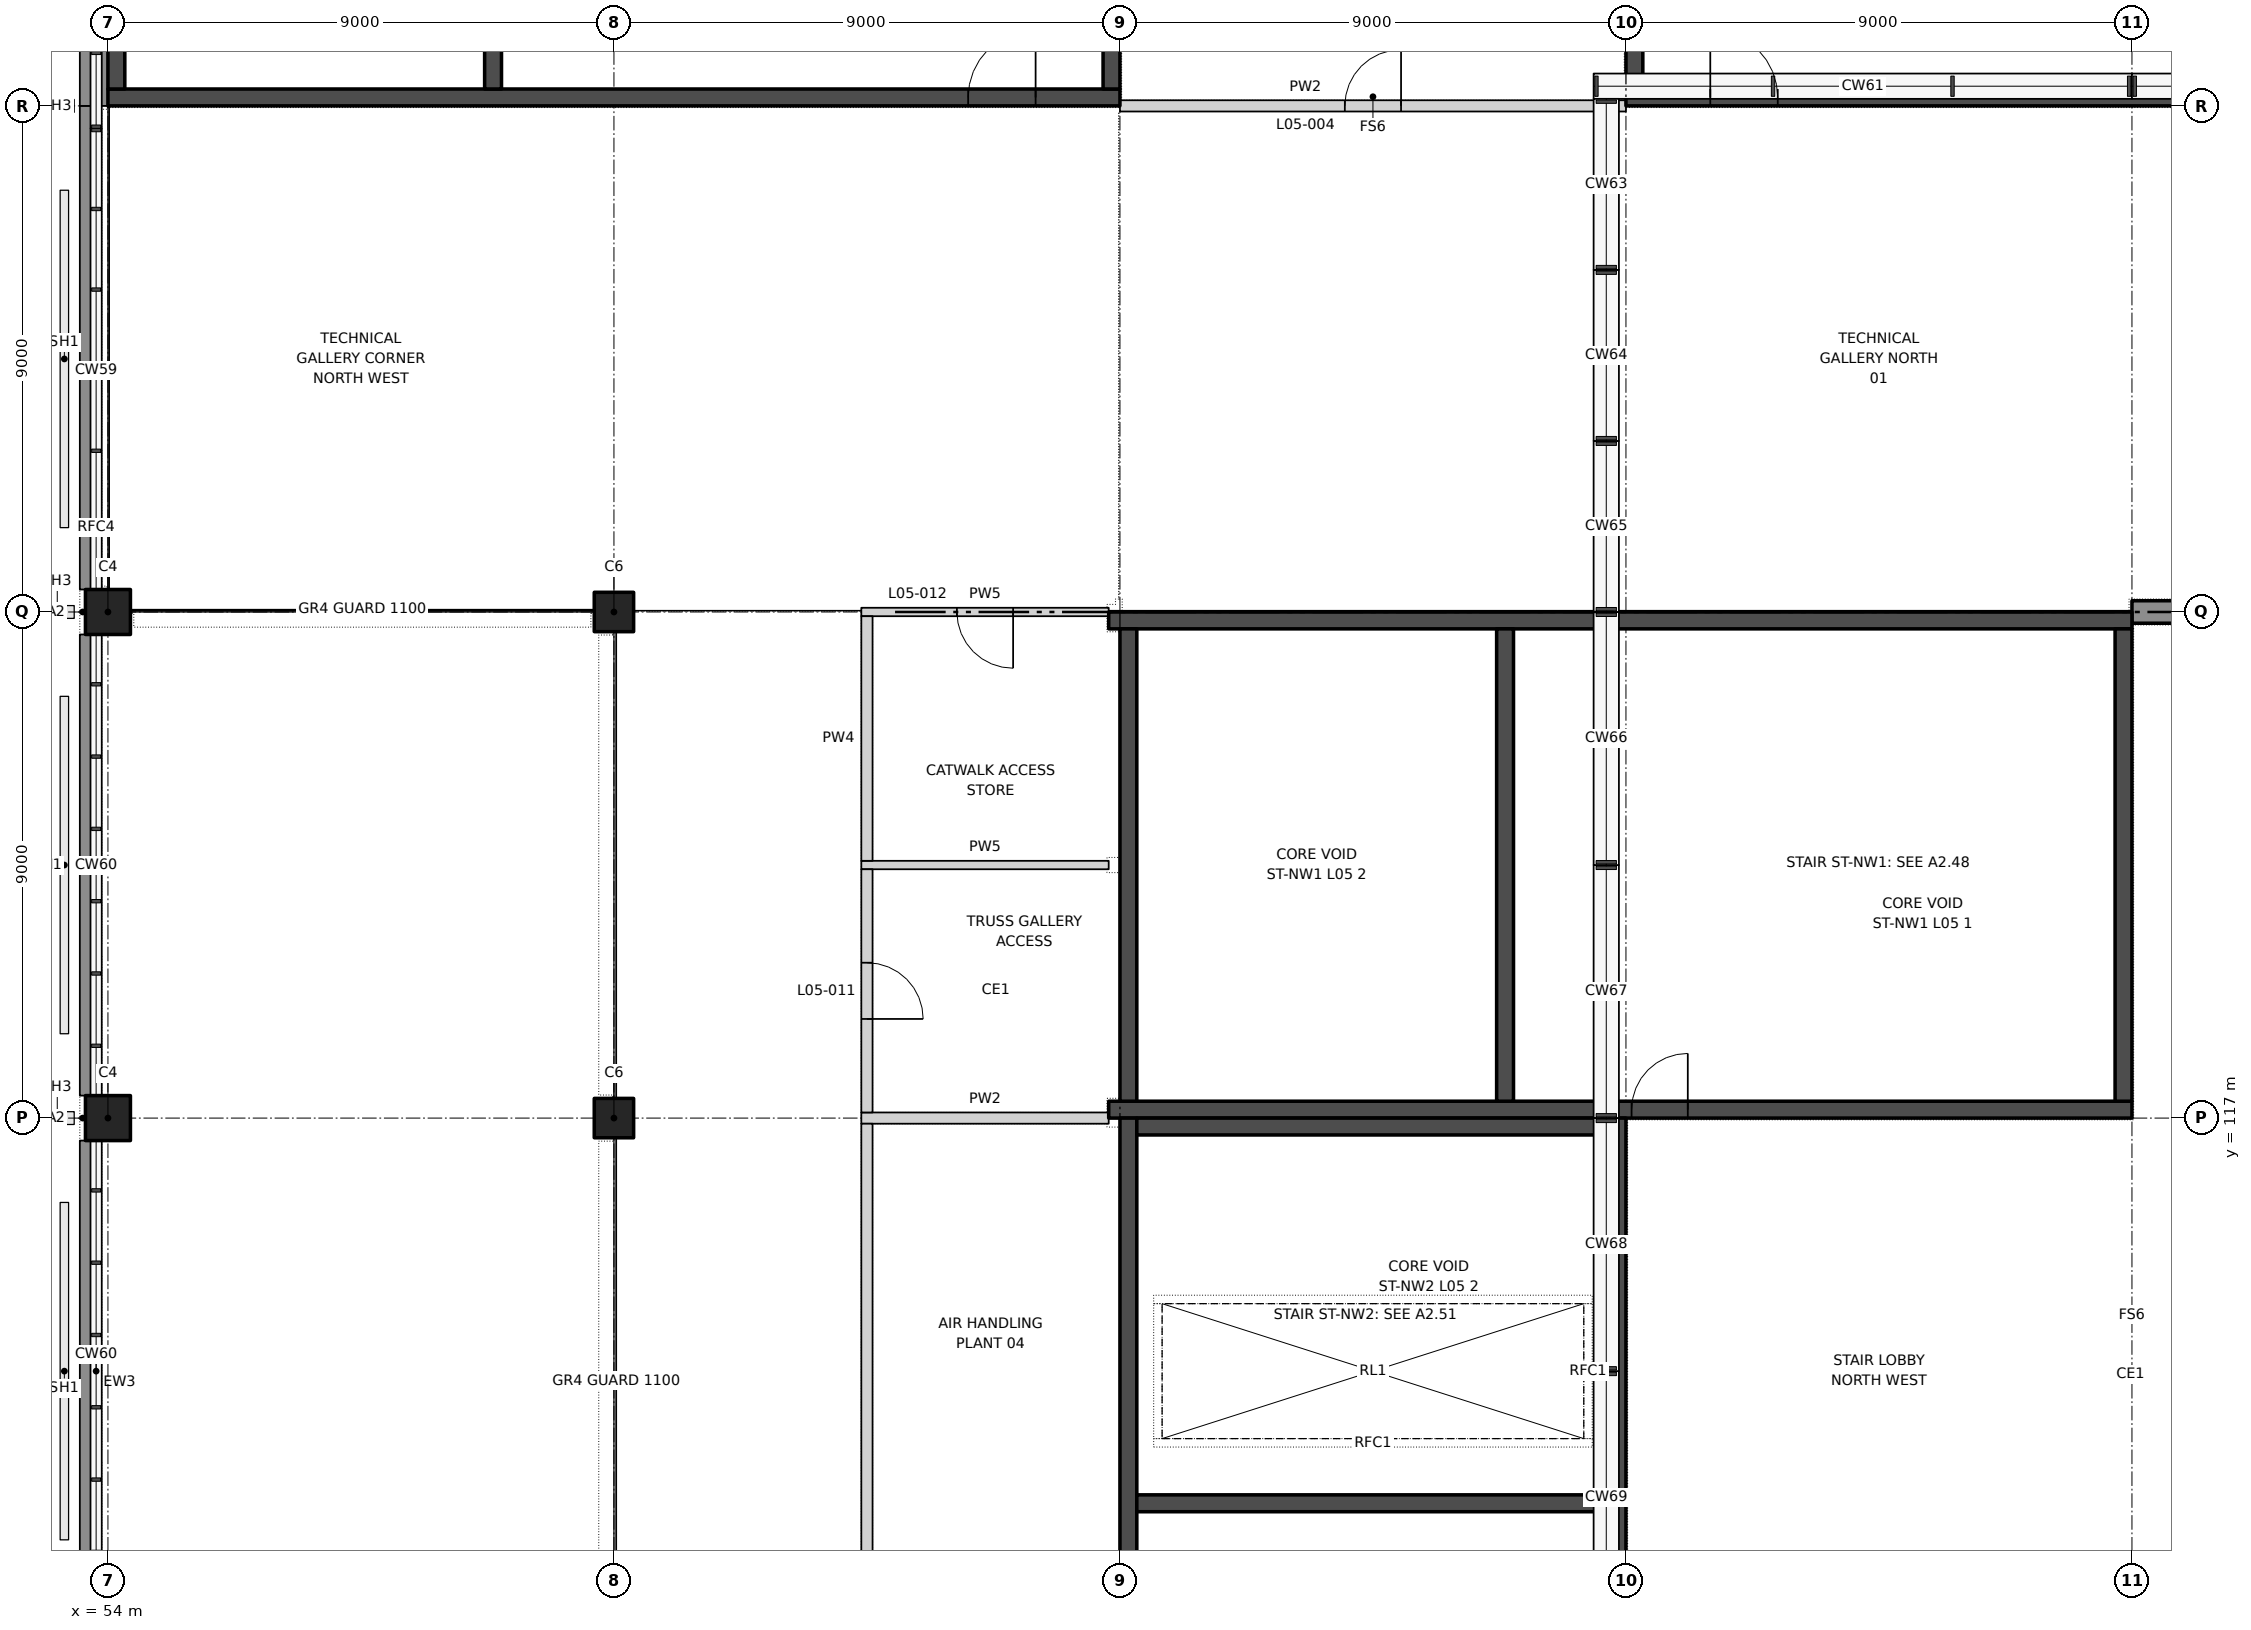
"""IFC4 building model, lengths in metres.
Left out: names, types, materials, properties, quantities, classifications, styles, units other than length and angle.
Written with IfcOpenShell. Run it as: python <this file> out.ifc"""

import sys

from ifc_helpers import new_model, si_unit, direction, frame, frame_2d, origin, origin_2d, place, context, subcontext, project, spatial, rectangle, extrude, element, fill, save


model = new_model("IFC4")
c1 = context("Model", 3, precision=1e-05, world=origin(), true_north=direction((0.0, 1.0)))
c2 = subcontext(c1, "Body", "Model", "MODEL_VIEW")
j1 = project(units=[si_unit("LENGTHUNIT", "METRE"), si_unit("PLANEANGLEUNIT", "RADIAN")], contexts=[c1])
p1 = place(None, origin())
s1 = spatial("IfcSite", under=j1, at=p1, CompositionType="ELEMENT")
p2 = place(p1, origin())
s2 = spatial("IfcBuilding", under=s1, at=p2, CompositionType="ELEMENT")
p3 = place(p2, frame((0.0, 0.0, 33.5)))
s3 = spatial("IfcBuildingStorey", under=s2, at=p3, CompositionType="ELEMENT", Elevation=33.5)
for number, where, z_axis, x_axis in (
    (1, (54.0, 117.0, 0.0), (0.0, 0.0, 1.0), (1.0, 0.0, 0.0)),
    (2, (54.0, 126.0, 0.0), (0.0, 0.0, 1.0), (1.0, 0.0, 0.0)),
):
    element("IfcColumn", number, at=place(p3, frame(where, z_axis=z_axis, x_axis=x_axis)), inside=s3, PredefinedType="COLUMN", context=c2, shape_type="SweptSolid", body=[
        extrude(rectangle(XDim=0.8, YDim=0.8, at=origin_2d()), origin(), (0.0, 0.0, 1.0), 4.0),
    ])
for number, where, z_axis, x_axis in (
    (3, (63.0, 117.0, 0.0), (0.0, 0.0, 1.0), (1.0, 0.0, 0.0)),
    (4, (63.0, 126.0, 0.0), (0.0, 0.0, 1.0), (1.0, 0.0, 0.0)),
):
    element("IfcColumn", number, at=place(p3, frame(where, z_axis=z_axis, x_axis=x_axis)), inside=s3, PredefinedType="COLUMN", context=c2, shape_type="SweptSolid", body=[
        extrude(rectangle(XDim=0.7, YDim=0.7, at=origin_2d()), origin(), (0.0, 0.0, 1.0), 4.0),
    ])
p4 = place(p3, frame((171.0, 126.0, 0.0), z_axis=(0.0, 0.0, 1.0), x_axis=(-1.0, 0.0, 0.0)))
e5 = element("IfcWall", 5, at=p4, inside=s3, PredefinedType="SOLIDWALL", context=c2, shape_type="SweptSolid", body=[
    extrude(rectangle(XDim=81.0, YDim=0.4, at=frame_2d((40.5, 0.0))), origin(), (0.0, 0.0, 1.0), 4.0),
])
p5 = place(p4, frame((75.9, 0.0, 0.0)))
e6 = element("IfcOpeningElement", 6, at=p5, cuts=e5, PredefinedType="OPENING", context=c2, shape_type="SweptSolid", body=[
    extrude(rectangle(XDim=1.2, YDim=2.1, at=frame_2d((0.6, 1.05))), frame((0.0, 0.21, 0.0), z_axis=(0.0, -1.0, 0.0), x_axis=(1.0, 0.0, 0.0)), (0.0, 0.0, 1.0), 0.42),
])
p6 = place(p4, frame((3.9, 0.0, 0.0)))
e7 = element("IfcOpeningElement", 7, at=p6, cuts=e5, PredefinedType="OPENING", context=c2, shape_type="SweptSolid", body=[
    extrude(rectangle(XDim=1.2, YDim=2.1, at=frame_2d((0.6, 1.05))), frame((0.0, 0.21, 0.0), z_axis=(0.0, -1.0, 0.0), x_axis=(1.0, 0.0, 0.0)), (0.0, 0.0, 1.0), 0.42),
])
p7 = place(p2, frame((0.0, 0.0, 28.0)))
s4 = spatial("IfcBuildingStorey", under=s2, at=p7, CompositionType="ELEMENT", Elevation=28.0)
p8 = place(p7, frame((54.4, 117.0, 0.0), z_axis=(0.0, 0.0, 1.0), x_axis=(1.0, 0.0, 0.0)))
e8 = element("IfcWall", 8, at=p8, inside=s4, PredefinedType="PARTITIONING", context=c2, shape_type="SweptSolid", body=[
    extrude(rectangle(XDim=8.25, YDim=0.15, at=frame_2d((4.125, 0.0))), origin(), (0.0, 0.0, 1.0), 9.5),
])
p9 = place(p3, frame((67.4, 117.0, 0.0), z_axis=(0.0, 0.0, 1.0), x_axis=(1.0, 0.0, 0.0)))
e9 = element("IfcWall", 9, at=p9, inside=s3, PredefinedType="PARTITIONING", context=c2, shape_type="SweptSolid", body=[
    extrude(rectangle(XDim=4.4, YDim=0.2, at=frame_2d((2.2, 0.0))), origin(), (0.0, 0.0, 1.0), 4.0),
])
p10 = place(p3, frame((67.4, 121.5, 0.0), z_axis=(0.0, 0.0, 1.0), x_axis=(1.0, 0.0, 0.0)))
e10 = element("IfcWall", 10, at=p10, inside=s3, PredefinedType="PARTITIONING", context=c2, shape_type="SweptSolid", body=[
    extrude(rectangle(XDim=4.4, YDim=0.15, at=frame_2d((2.2, 0.0))), origin(), (0.0, 0.0, 1.0), 4.0),
])
p11 = place(p3, frame((67.4, 126.0, 0.0), z_axis=(0.0, 0.0, 1.0), x_axis=(1.0, 0.0, 0.0)))
e11 = element("IfcWall", 11, at=p11, inside=s3, PredefinedType="PARTITIONING", context=c2, shape_type="SweptSolid", body=[
    extrude(rectangle(XDim=4.4, YDim=0.15, at=frame_2d((2.2, 0.0))), origin(), (0.0, 0.0, 1.0), 4.0),
])
p12 = place(p11, frame((1.7, 0.0, 0.0)))
e12 = element("IfcOpeningElement", 12, at=p12, cuts=e11, PredefinedType="OPENING", context=c2, shape_type="SweptSolid", body=[
    extrude(rectangle(XDim=1.0, YDim=2.1, at=frame_2d((0.5, 1.05))), frame((0.0, 0.085, 0.0), z_axis=(0.0, -1.0, 0.0), x_axis=(1.0, 0.0, 0.0)), (0.0, 0.0, 1.0), 0.17),
])
p13 = place(p3, frame((72.0, 135.0, 0.0), z_axis=(0.0, 0.0, 1.0), x_axis=(1.0, 0.0, 0.0)))
e13 = element("IfcWall", 13, at=p13, inside=s3, PredefinedType="PARTITIONING", context=c2, shape_type="SweptSolid", body=[
    extrude(rectangle(XDim=9.0, YDim=0.2, at=frame_2d((4.5, 0.0))), origin(), (0.0, 0.0, 1.0), 4.0),
])
p14 = place(p13, frame((4.0, 0.0, 0.0)))
e14 = element("IfcOpeningElement", 14, at=p14, cuts=e13, PredefinedType="OPENING", context=c2, shape_type="SweptSolid", body=[
    extrude(rectangle(XDim=1.0, YDim=2.1, at=frame_2d((0.5, 1.05))), frame((0.0, 0.11, 0.0), z_axis=(0.0, -1.0, 0.0), x_axis=(1.0, 0.0, 0.0)), (0.0, 0.0, 1.0), 0.22),
])
p15 = place(p3, frame((67.5, 99.1, 0.0), z_axis=(0.0, 0.0, 1.0), x_axis=(0.0, 1.0, 0.0)))
e15 = element("IfcWall", 15, at=p15, inside=s3, PredefinedType="PARTITIONING", context=c2, shape_type="SweptSolid", body=[
    extrude(rectangle(XDim=17.8, YDim=0.2, at=frame_2d((8.9, 0.0))), origin(), (0.0, 0.0, 1.0), 4.0),
])
p16 = place(p15, frame((8.0, 0.0, 0.0)))
e16 = element("IfcOpeningElement", 16, at=p16, cuts=e15, PredefinedType="OPENING", context=c2, shape_type="SweptSolid", body=[
    extrude(rectangle(XDim=1.8, YDim=2.1, at=frame_2d((0.9, 1.05))), frame((0.0, 0.11, 0.0), z_axis=(0.0, -1.0, 0.0), x_axis=(1.0, 0.0, 0.0)), (0.0, 0.0, 1.0), 0.22),
])
p17 = place(p3, frame((67.5, 117.1, 0.0), z_axis=(0.0, 0.0, 1.0), x_axis=(0.0, 1.0, 0.0)))
e17 = element("IfcWall", 17, at=p17, inside=s3, PredefinedType="PARTITIONING", context=c2, shape_type="SweptSolid", body=[
    extrude(rectangle(XDim=4.325, YDim=0.2, at=frame_2d((2.163, 0.0))), origin(), (0.0, 0.0, 1.0), 4.0),
])
p18 = place(p17, frame((1.663, 0.0, 0.0)))
e18 = element("IfcOpeningElement", 18, at=p18, cuts=e17, PredefinedType="OPENING", context=c2, shape_type="SweptSolid", body=[
    extrude(rectangle(XDim=1.0, YDim=2.1, at=frame_2d((0.5, 1.05))), frame((0.0, 0.11, 0.0), z_axis=(0.0, -1.0, 0.0), x_axis=(1.0, 0.0, 0.0)), (0.0, 0.0, 1.0), 0.22),
])
p19 = place(p3, frame((67.5, 121.575, 0.0), z_axis=(0.0, 0.0, 1.0), x_axis=(0.0, 1.0, 0.0)))
e19 = element("IfcWall", 19, at=p19, inside=s3, PredefinedType="PARTITIONING", context=c2, shape_type="SweptSolid", body=[
    extrude(rectangle(XDim=4.35, YDim=0.2, at=frame_2d((2.175, 0.0))), origin(), (0.0, 0.0, 1.0), 4.0),
])
p20 = place(p3, frame((53.65, 116.6, 0.0), z_axis=(0.0, 0.0, 1.0), x_axis=(0.0, -1.0, 0.0)))
e20 = element("IfcWall", 20, at=p20, inside=s3, PredefinedType="SOLIDWALL", context=c2, shape_type="SweptSolid", body=[
    extrude(rectangle(XDim=8.6, YDim=0.3, at=frame_2d((4.3, 0.0))), origin(), (0.0, 0.0, 1.0), 4.0),
])
p21 = place(p3, frame((53.65, 125.6, 0.0), z_axis=(0.0, 0.0, 1.0), x_axis=(0.0, -1.0, 0.0)))
e21 = element("IfcWall", 21, at=p21, inside=s3, PredefinedType="SOLIDWALL", context=c2, shape_type="SweptSolid", body=[
    extrude(rectangle(XDim=8.2, YDim=0.3, at=frame_2d((4.1, 0.0))), origin(), (0.0, 0.0, 1.0), 4.0),
])
p22 = place(p3, frame((53.65, 135.0, 0.0), z_axis=(0.0, 0.0, 1.0), x_axis=(0.0, -1.0, 0.0)))
e22 = element("IfcWall", 22, at=p22, inside=s3, PredefinedType="SOLIDWALL", context=c2, shape_type="SweptSolid", body=[
    extrude(rectangle(XDim=8.6, YDim=0.3, at=frame_2d((4.3, 0.0))), origin(), (0.0, 0.0, 1.0), 4.0),
])
p23 = place(p3, frame((53.75, 144.5, 0.0), z_axis=(0.0, 0.0, 1.0), x_axis=(0.0, -1.0, 0.0)))
e23 = element("IfcWall", 23, at=p23, inside=s3, PredefinedType="SOLIDWALL", context=c2, shape_type="SweptSolid", body=[
    extrude(rectangle(XDim=9.5, YDim=0.5, at=frame_2d((4.75, 0.0))), origin(), (0.0, 0.0, 1.0), 4.0),
])
p24 = place(p3, frame((81.0, 135.15, 0.0), z_axis=(0.0, 0.0, 1.0), x_axis=(1.0, 0.0, 0.0)))
e24 = element("IfcWall", 24, at=p24, inside=s3, PredefinedType="SHEAR", context=c2, shape_type="SweptSolid", body=[
    extrude(rectangle(XDim=18.0, YDim=0.3, at=frame_2d((9.0, 0.0))), origin(), (0.0, 0.0, 1.0), 4.0),
])
p25 = place(p24, frame((1.5, 0.0, 0.0)))
e25 = element("IfcOpeningElement", 25, at=p25, cuts=e24, PredefinedType="OPENING", context=c2, shape_type="SweptSolid", body=[
    extrude(rectangle(XDim=1.2, YDim=2.1, at=frame_2d((0.6, 1.05))), frame((0.0, 0.16, 0.0), z_axis=(0.0, -1.0, 0.0), x_axis=(1.0, 0.0, 0.0)), (0.0, 0.0, 1.0), 0.32),
])
p26 = place(p3, frame((81.15, 135.3, 0.0), z_axis=(0.0, 0.0, 1.0), x_axis=(0.0, 1.0, 0.0)))
e26 = element("IfcWall", 26, at=p26, inside=s3, PredefinedType="SHEAR", context=c2, shape_type="SweptSolid", body=[
    extrude(rectangle(XDim=8.7, YDim=0.3, at=frame_2d((4.35, 0.0))), origin(), (0.0, 0.0, 1.0), 4.0),
])
p27 = place(p3, frame((72.0, 135.15, 0.0), z_axis=(0.0, 0.0, 1.0), x_axis=(-1.0, 0.0, 0.0)))
e27 = element("IfcWall", 27, at=p27, inside=s3, PredefinedType="SHEAR", context=c2, shape_type="SweptSolid", body=[
    extrude(rectangle(XDim=18.0, YDim=0.3, at=frame_2d((9.0, 0.0))), origin(), (0.0, 0.0, 1.0), 4.0),
])
p28 = place(p27, frame((1.5, 0.0, 0.0)))
e28 = element("IfcOpeningElement", 28, at=p28, cuts=e27, PredefinedType="OPENING", context=c2, shape_type="SweptSolid", body=[
    extrude(rectangle(XDim=1.2, YDim=2.1, at=frame_2d((0.6, 1.05))), frame((0.0, 0.16, 0.0), z_axis=(0.0, -1.0, 0.0), x_axis=(1.0, 0.0, 0.0)), (0.0, 0.0, 1.0), 0.32),
])
for number, where, z_axis, x_axis in (
    (29, (71.85, 135.3, 0.0), (0.0, 0.0, 1.0), (0.0, 1.0, 0.0)),
    (30, (54.15, 135.3, 0.0), (0.0, 0.0, 1.0), (0.0, 1.0, 0.0)),
    (31, (60.85, 135.3, 0.0), (0.0, 0.0, 1.0), (0.0, 1.0, 0.0)),
):
    element("IfcWall", number, at=place(p3, frame(where, z_axis=z_axis, x_axis=x_axis)), inside=s3, PredefinedType="SHEAR", context=c2, shape_type="SweptSolid", body=[
        extrude(rectangle(XDim=8.7, YDim=0.3, at=frame_2d((4.35, 0.0))), origin(), (0.0, 0.0, 1.0), 4.0),
    ])
p29 = place(p3, frame((90.0, 117.15, 0.0), z_axis=(0.0, 0.0, 1.0), x_axis=(-1.0, 0.0, 0.0)))
e32 = element("IfcWall", 32, at=p29, inside=s3, PredefinedType="SHEAR", context=c2, shape_type="SweptSolid", body=[
    extrude(rectangle(XDim=18.2, YDim=0.3, at=frame_2d((9.1, 0.0))), origin(), (0.0, 0.0, 1.0), 4.0),
])
p30 = place(p29, frame((7.9, 0.0, 0.0)))
e33 = element("IfcOpeningElement", 33, at=p30, cuts=e32, PredefinedType="OPENING", context=c2, shape_type="SweptSolid", body=[
    extrude(rectangle(XDim=1.0, YDim=2.1, at=frame_2d((0.5, 1.05))), frame((0.0, 0.16, 0.0), z_axis=(0.0, -1.0, 0.0), x_axis=(1.0, 0.0, 0.0)), (0.0, 0.0, 1.0), 0.32),
])
p31 = place(p3, frame((90.0, 125.85, 0.0), z_axis=(0.0, 0.0, 1.0), x_axis=(-1.0, 0.0, 0.0)))
e34 = element("IfcWall", 34, at=p31, inside=s3, PredefinedType="SHEAR", context=c2, shape_type="SweptSolid", body=[
    extrude(rectangle(XDim=18.2, YDim=0.3, at=frame_2d((9.1, 0.0))), origin(), (0.0, 0.0, 1.0), 4.0),
])
for number, where, z_axis, x_axis in (
    (35, (89.85, 117.3, 0.0), (0.0, 0.0, 1.0), (0.0, 1.0, 0.0)),
    (36, (72.15, 117.3, 0.0), (0.0, 0.0, 1.0), (0.0, 1.0, 0.0)),
    (37, (78.85, 117.3, 0.0), (0.0, 0.0, 1.0), (0.0, 1.0, 0.0)),
):
    element("IfcWall", number, at=place(p3, frame(where, z_axis=z_axis, x_axis=x_axis)), inside=s3, PredefinedType="SHEAR", context=c2, shape_type="SweptSolid", body=[
        extrude(rectangle(XDim=8.4, YDim=0.3, at=frame_2d((4.2, 0.0))), origin(), (0.0, 0.0, 1.0), 4.0),
    ])
p32 = place(p3, frame((80.85, 99.0, 0.0), z_axis=(0.0, 0.0, 1.0), x_axis=(0.0, 1.0, 0.0)))
e38 = element("IfcWall", 38, at=p32, inside=s3, PredefinedType="SHEAR", context=c2, shape_type="SweptSolid", body=[
    extrude(rectangle(XDim=18.0, YDim=0.3, at=frame_2d((9.0, 0.0))), origin(), (0.0, 0.0, 1.0), 4.0),
])
p33 = place(p32, frame((8.6, 0.0, 0.0)))
e39 = element("IfcOpeningElement", 39, at=p33, cuts=e38, PredefinedType="OPENING", context=c2, shape_type="SweptSolid", body=[
    extrude(rectangle(XDim=1.2, YDim=2.1, at=frame_2d((0.6, 1.05))), frame((0.0, 0.16, 0.0), z_axis=(0.0, -1.0, 0.0), x_axis=(1.0, 0.0, 0.0)), (0.0, 0.0, 1.0), 0.32),
])
p34 = place(p3, frame((72.15, 99.0, 0.0), z_axis=(0.0, 0.0, 1.0), x_axis=(0.0, 1.0, 0.0)))
e40 = element("IfcWall", 40, at=p34, inside=s3, PredefinedType="SHEAR", context=c2, shape_type="SweptSolid", body=[
    extrude(rectangle(XDim=18.0, YDim=0.3, at=frame_2d((9.0, 0.0))), origin(), (0.0, 0.0, 1.0), 4.0),
])
for number, where, z_axis, x_axis in (
    (41, (80.7, 116.85, 0.0), (0.0, 0.0, 1.0), (-1.0, 0.0, 0.0)),
    (42, (80.7, 110.15, 0.0), (0.0, 0.0, 1.0), (-1.0, 0.0, 0.0)),
):
    element("IfcWall", number, at=place(p3, frame(where, z_axis=z_axis, x_axis=x_axis)), inside=s3, PredefinedType="SHEAR", context=c2, shape_type="SweptSolid", body=[
        extrude(rectangle(XDim=8.4, YDim=0.3, at=frame_2d((4.2, 0.0))), origin(), (0.0, 0.0, 1.0), 4.0),
    ])
p35 = place(p14, origin())
e43 = element("IfcDoor", 43, at=p35, inside=s3, OperationType="SINGLE_SWING_RIGHT", PredefinedType="DOOR", context=c2, shape_type="SweptSolid", body=[
    extrude(rectangle(XDim=1.0, YDim=2.1, at=frame_2d((0.5, 1.05))), frame((0.0, 0.025, 0.0), z_axis=(0.0, -1.0, 0.0), x_axis=(1.0, 0.0, 0.0)), (0.0, 0.0, 1.0), 0.05),
])
fill(e14, e43)
p36 = place(p18, frame((1.0, 0.0, 0.0), z_axis=(0.0, 0.0, 1.0), x_axis=(-1.0, 0.0, 0.0)))
e44 = element("IfcDoor", 44, at=p36, inside=s3, OperationType="SINGLE_SWING_RIGHT", PredefinedType="DOOR", context=c2, shape_type="SweptSolid", body=[
    extrude(rectangle(XDim=1.0, YDim=2.1, at=frame_2d((0.5, 1.05))), frame((0.0, 0.025, 0.0), z_axis=(0.0, -1.0, 0.0), x_axis=(1.0, 0.0, 0.0)), (0.0, 0.0, 1.0), 0.05),
])
fill(e18, e44)
p37 = place(p12, frame((1.0, 0.0, 0.0), z_axis=(0.0, 0.0, 1.0), x_axis=(-1.0, 0.0, 0.0)))
e45 = element("IfcDoor", 45, at=p37, inside=s3, OperationType="SINGLE_SWING_LEFT", PredefinedType="DOOR", context=c2, shape_type="SweptSolid", body=[
    extrude(rectangle(XDim=1.0, YDim=2.1, at=frame_2d((0.5, 1.05))), frame((0.0, 0.025, 0.0), z_axis=(0.0, -1.0, 0.0), x_axis=(1.0, 0.0, 0.0)), (0.0, 0.0, 1.0), 0.05),
])
fill(e12, e45)
p38 = place(p25, origin())
e46 = element("IfcDoor", 46, at=p38, inside=s3, OperationType="SINGLE_SWING_LEFT", PredefinedType="DOOR", context=c2, shape_type="SweptSolid", body=[
    extrude(rectangle(XDim=1.2, YDim=2.1, at=frame_2d((0.6, 1.05))), frame((0.0, 0.025, 0.0), z_axis=(0.0, -1.0, 0.0), x_axis=(1.0, 0.0, 0.0)), (0.0, 0.0, 1.0), 0.05),
])
fill(e25, e46)
p39 = place(p28, frame((1.2, 0.0, 0.0), z_axis=(0.0, 0.0, 1.0), x_axis=(-1.0, 0.0, 0.0)))
e47 = element("IfcDoor", 47, at=p39, inside=s3, OperationType="SINGLE_SWING_RIGHT", PredefinedType="DOOR", context=c2, shape_type="SweptSolid", body=[
    extrude(rectangle(XDim=1.2, YDim=2.1, at=frame_2d((0.6, 1.05))), frame((0.0, 0.025, 0.0), z_axis=(0.0, -1.0, 0.0), x_axis=(1.0, 0.0, 0.0)), (0.0, 0.0, 1.0), 0.05),
])
fill(e28, e47)
p40 = place(p30, frame((1.0, 0.0, 0.0), z_axis=(0.0, 0.0, 1.0), x_axis=(-1.0, 0.0, 0.0)))
e48 = element("IfcDoor", 48, at=p40, inside=s3, OperationType="SINGLE_SWING_RIGHT", PredefinedType="DOOR", context=c2, shape_type="SweptSolid", body=[
    extrude(rectangle(XDim=1.0, YDim=2.1, at=frame_2d((0.5, 1.05))), frame((0.0, 0.025, 0.0), z_axis=(0.0, -1.0, 0.0), x_axis=(1.0, 0.0, 0.0)), (0.0, 0.0, 1.0), 0.05),
])
fill(e33, e48)
p41 = place(p2, frame((0.0, 0.0, 47.1)))
p42 = place(p41, frame((0.0, 0.0, -0.3)))
p43 = place(p42, frame((76.5, 112.5, 0.0)))
p44 = place(p43, frame((0.0, 0.0, 0.25)))
e49 = element("IfcWindow", 49, at=p44, inside=s3, PartitioningType="SINGLE_PANEL", PredefinedType="SKYLIGHT", context=c2, shape_type="SweptSolid", body=[
    extrude(rectangle(XDim=7.5, YDim=2.4, at=origin_2d()), origin(), (0.0, 0.0, 1.0), 0.05),
])
save(model, sys.argv[1])
